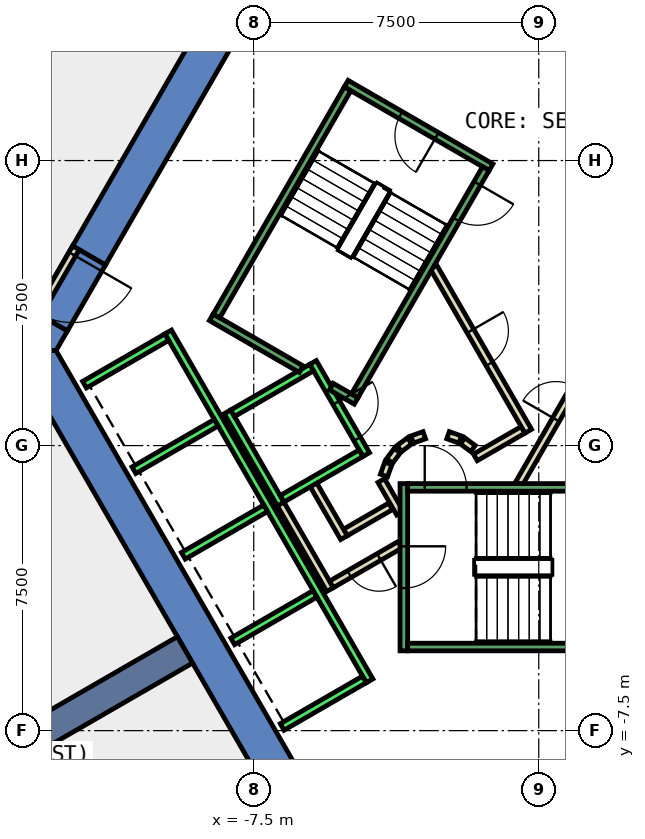
"""IFC4 building model, lengths in metres.
Left out: names, types, materials, properties, quantities, classifications, styles, units other than length and angle.
Written with IfcOpenShell. Run it as: python <this file> out.ifc"""

import sys

from ifc_helpers import new_model, si_unit, direction, frame, frame_2d, origin, place, context, subcontext, project, spatial, polyline, rectangle, outline, extrude, element, fill, save


model = new_model("IFC4")
c1 = context("Model", 3, precision=1e-05, world=origin(), true_north=direction((0.0, 1.0)))
c2 = subcontext(c1, "Body", "Model", "MODEL_VIEW")
j1 = project(units=[si_unit("LENGTHUNIT", "METRE"), si_unit("PLANEANGLEUNIT", "RADIAN")], contexts=[c1])
p1 = place(None, origin())
s1 = spatial("IfcSite", under=j1, at=p1, CompositionType="ELEMENT")
p2 = place(p1, origin())
s2 = spatial("IfcBuilding", under=s1, at=p2, CompositionType="ELEMENT")
p3 = place(p2, frame((0.0, 0.0, 30.0)))
s3 = spatial("IfcBuildingStorey", under=s2, at=p3, CompositionType="ELEMENT", Elevation=30.0)
p4 = place(p3, frame((0.0, 0.0, -0.45)))
e1 = element("IfcWall", 1, at=p4, inside=s3, PredefinedType="SHEAR", context=c2, shape_type="SweptSolid", body=[
    extrude(outline(polyline([(-12.267, 5.252), (-11.402, 4.752), (-6.351, 13.5), (-6.928, 14.5), (-12.267, 5.252)])), origin(), (0.0, 0.0, 1.0), 4.85),
])
p5 = place(p3, frame((0.0, 0.0, -0.45)))
e2 = element("IfcWall", 2, at=p5, inside=s3, PredefinedType="SHEAR", context=c2, shape_type="SweptSolid", body=[
    extrude(outline(polyline([(-12.402, 3.02), (-13.267, 3.52), (-13.856, 2.5), (-12.702, 2.5), (-12.402, 3.02)])), origin(), (0.0, 0.0, 1.0), 4.85),
])
p6 = place(p3, frame((0.0, 0.0, 3.6)))
e3 = element("IfcWall", 3, at=p6, inside=s3, PredefinedType="SHEAR", context=c2, shape_type="SweptSolid", body=[
    extrude(outline(polyline([(-13.267, 3.52), (-12.402, 3.02), (-11.402, 4.752), (-12.267, 5.252), (-13.267, 3.52)])), origin(), (0.0, 0.0, 1.0), 0.8),
])
p7 = place(p3, frame((0.0, 0.0, -0.45)))
e4 = element("IfcWall", 4, at=p7, inside=s3, PredefinedType="SHEAR", context=c2, shape_type="SweptSolid", body=[
    extrude(outline(polyline([(-13.856, 2.5), (-6.928, -9.5), (-6.351, -8.5), (-12.702, 2.5), (-13.856, 2.5)])), origin(), (0.0, 0.0, 1.0), 4.85),
])
p8 = place(p3, frame((-9.31, -5.375, -0.45), z_axis=(0.0, 0.0, 1.0), x_axis=(-0.866017533419, -0.500013631625, 0.0)))
e5 = element("IfcWall", 5, at=p8, inside=s3, PredefinedType="SHEAR", context=c2, shape_type="SweptSolid", body=[
    extrude(rectangle(XDim=9.0, YDim=0.8, at=frame_2d((4.5, 0.0))), origin(), (0.0, 0.0, 1.0), 4.85),
])
p9 = place(p3, frame((-3.9, -1.599, 0.0), z_axis=(0.0, 0.0, 1.0), x_axis=(-0.865969445389, -0.500096910261, 0.0)))
e6 = element("IfcWall", 6, at=p9, inside=s3, PredefinedType="PARTITIONING", context=c2, shape_type="SweptSolid", body=[
    extrude(rectangle(XDim=1.373, YDim=0.2, at=frame_2d((0.687, 0.0))), origin(), (0.0, 0.0, 1.0), 4.4),
])
p10 = place(p3, frame((-5.126, -2.422, 0.0), z_axis=(0.0, 0.0, 1.0), x_axis=(-0.500062241894, 0.865989465428, 0.0)))
e7 = element("IfcWall", 7, at=p10, inside=s3, PredefinedType="PARTITIONING", context=c2, shape_type="SweptSolid", body=[
    extrude(rectangle(XDim=1.7, YDim=0.2, at=frame_2d((0.85, 0.0))), origin(), (0.0, 0.0, 1.0), 4.4),
])
p11 = place(p3, frame((-5.492, -3.788, 0.0), z_axis=(0.0, 0.0, 1.0), x_axis=(-0.500008949224, 0.866020236886, 0.0)))
e8 = element("IfcWall", 8, at=p11, inside=s3, PredefinedType="PARTITIONING", context=c2, shape_type="SweptSolid", body=[
    extrude(rectangle(XDim=2.68, YDim=0.2, at=frame_2d((1.34, 0.0))), origin(), (0.0, 0.0, 1.0), 4.4),
])
p12 = place(p3, frame((-4.145, -0.92, 0.0), z_axis=(0.0, 0.0, 1.0), x_axis=(0.499743786207, -0.866173278362, 0.0)))
e9 = element("IfcWall", 9, at=p12, inside=s3, PredefinedType="PARTITIONING", context=c2, shape_type="SweptSolid", body=[
    extrude(rectangle(XDim=0.991, YDim=0.2, at=frame_2d((0.495, 0.0))), origin(), (0.0, 0.0, 1.0), 4.4),
])
p13 = place(p3, frame((-3.65, -2.61, 0.0), z_axis=(0.0, 0.0, 1.0), x_axis=(-0.866072462134, -0.499918483688, 0.0)))
e10 = element("IfcWall", 10, at=p13, inside=s3, PredefinedType="PARTITIONING", context=c2, shape_type="SweptSolid", body=[
    extrude(rectangle(XDim=2.084, YDim=0.2, at=frame_2d((1.042, 0.0))), origin(), (0.0, 0.0, 1.0), 4.4),
])
p14 = place(p13, frame((0.642, 0.0, 0.0)))
e11 = element("IfcOpeningElement", 11, at=p14, cuts=e10, PredefinedType="OPENING", context=c2, shape_type="SweptSolid", body=[
    extrude(rectangle(XDim=0.9, YDim=2.1, at=frame_2d((0.45, 1.05))), frame((0.0, 0.11, 0.0), z_axis=(0.0, -1.0, 0.0), x_axis=(1.0, 0.0, 0.0)), (0.0, 0.0, 1.0), 0.22),
])
p15 = place(p3, frame((-0.52, -1.0, 0.0), z_axis=(0.0, 0.0, 1.0), x_axis=(0.50011622646, 0.865958290007, 0.0)))
e12 = element("IfcWall", 12, at=p15, inside=s3, PredefinedType="PARTITIONING", context=c2, shape_type="SweptSolid", body=[
    extrude(rectangle(XDim=4.991, YDim=0.2, at=frame_2d((2.496, 0.0))), origin(), (0.0, 0.0, 1.0), 4.4),
])
p16 = place(p15, frame((1.945, 0.0, 0.0)))
e13 = element("IfcOpeningElement", 13, at=p16, cuts=e12, PredefinedType="OPENING", context=c2, shape_type="SweptSolid", body=[
    extrude(rectangle(XDim=1.0, YDim=2.1, at=frame_2d((0.5, 1.05))), frame((0.0, 0.11, 0.0), z_axis=(0.0, -1.0, 0.0), x_axis=(1.0, 0.0, 0.0)), (0.0, 0.0, 1.0), 0.22),
])
p17 = place(p3, frame((-0.412, 0.414, 0.0), z_axis=(0.0, 0.0, 1.0), x_axis=(-0.866017369001, -0.500013916395, 0.0)))
e14 = element("IfcWall", 14, at=p17, inside=s3, PredefinedType="PARTITIONING", context=c2, shape_type="SweptSolid", body=[
    extrude(rectangle(XDim=1.45, YDim=0.2, at=frame_2d((0.725, 0.0))), origin(), (0.0, 0.0, 1.0), 4.4),
])
p18 = place(p3, frame((-1.731, -0.077, 0.0), z_axis=(0.0, 0.0, 1.0), x_axis=(-0.804311165252, 0.594208338422, 0.0)))
e15 = element("IfcWall", 15, at=p18, inside=s3, PredefinedType="PARTITIONING", context=c2, shape_type="SweptSolid", body=[
    extrude(rectangle(XDim=0.338, YDim=0.2, at=frame_2d((0.169, 0.0))), origin(), (0.0, 0.0, 1.0), 4.4),
])
p19 = place(p3, frame((-2.07, 0.16, 0.0), z_axis=(0.0, 0.0, 1.0), x_axis=(-0.942199461132, 0.335052496547, 0.0)))
e16 = element("IfcWall", 16, at=p19, inside=s3, PredefinedType="PARTITIONING", context=c2, shape_type="SweptSolid", body=[
    extrude(rectangle(XDim=0.337, YDim=0.2, at=frame_2d((0.169, 0.0))), origin(), (0.0, 0.0, 1.0), 4.4),
])
p20 = place(p3, frame((-3.012, 0.273, 0.0), z_axis=(0.0, 0.0, 1.0), x_axis=(-0.942280615813, -0.334824194261, 0.0)))
e17 = element("IfcWall", 17, at=p20, inside=s3, PredefinedType="PARTITIONING", context=c2, shape_type="SweptSolid", body=[
    extrude(rectangle(XDim=0.338, YDim=0.2, at=frame_2d((0.169, 0.0))), origin(), (0.0, 0.0, 1.0), 4.4),
])
p21 = place(p3, frame((-3.397, 0.124, 0.0), z_axis=(0.0, 0.0, 1.0), x_axis=(-0.804311165252, -0.594208338422, 0.0)))
e18 = element("IfcWall", 18, at=p21, inside=s3, PredefinedType="PARTITIONING", context=c2, shape_type="SweptSolid", body=[
    extrude(rectangle(XDim=0.338, YDim=0.2, at=frame_2d((0.169, 0.0))), origin(), (0.0, 0.0, 1.0), 4.4),
])
p22 = place(p3, frame((-3.723, -0.131, 0.0), z_axis=(0.0, 0.0, 1.0), x_axis=(-0.594675113454, -0.803966112121, 0.0)))
e19 = element("IfcWall", 19, at=p22, inside=s3, PredefinedType="PARTITIONING", context=c2, shape_type="SweptSolid", body=[
    extrude(rectangle(XDim=0.338, YDim=0.2, at=frame_2d((0.169, 0.0))), origin(), (0.0, 0.0, 1.0), 4.4),
])
p23 = place(p3, frame((-3.96, -0.47, 0.0), z_axis=(0.0, 0.0, 1.0), x_axis=(-0.334824194261, -0.942280615813, 0.0)))
e20 = element("IfcWall", 20, at=p23, inside=s3, PredefinedType="PARTITIONING", context=c2, shape_type="SweptSolid", body=[
    extrude(rectangle(XDim=0.338, YDim=0.2, at=frame_2d((0.169, 0.0))), origin(), (0.0, 0.0, 1.0), 4.4),
])
p24 = place(p3, frame((-2.771, 4.7, 0.0), z_axis=(0.0, 0.0, 1.0), x_axis=(0.499969479948, -0.866043023828, 0.0)))
e21 = element("IfcWall", 21, at=p24, inside=s3, PredefinedType="PARTITIONING", context=c2, shape_type="SweptSolid", body=[
    extrude(rectangle(XDim=4.99, YDim=0.2, at=frame_2d((2.495, 0.0))), origin(), (0.0, 0.0, 1.0), 4.4),
])
p25 = place(p24, frame((1.945, 0.0, 0.0)))
e22 = element("IfcOpeningElement", 22, at=p25, cuts=e21, PredefinedType="OPENING", context=c2, shape_type="SweptSolid", body=[
    extrude(rectangle(XDim=1.0, YDim=2.1, at=frame_2d((0.5, 1.05))), frame((0.0, 0.11, 0.0), z_axis=(0.0, -1.0, 0.0), x_axis=(1.0, 0.0, 0.0)), (0.0, 0.0, 1.0), 0.22),
])
p26 = place(p3, frame((-12.18, 5.202, 0.0), z_axis=(0.0, 0.0, 1.0), x_axis=(-0.50002537861, -0.866010750942, 0.0)))
e23 = element("IfcWall", 23, at=p26, inside=s3, PredefinedType="PARTITIONING", context=c2, shape_type="SweptSolid", body=[
    extrude(rectangle(XDim=2.0, YDim=0.2, at=frame_2d((1.0, 0.0))), origin(), (0.0, 0.0, 1.0), 2.4),
])
p27 = place(p26, frame((0.19, 0.0, 0.0)))
e24 = element("IfcOpeningElement", 24, at=p27, cuts=e23, PredefinedType="OPENING", context=c2, shape_type="SweptSolid", body=[
    extrude(rectangle(XDim=1.8, YDim=2.1, at=frame_2d((0.9, 1.05))), frame((0.0, 0.11, 0.0), z_axis=(0.0, -1.0, 0.0), x_axis=(1.0, 0.0, 0.0)), (0.0, 0.0, 1.0), 0.22),
])
p28 = place(p3, frame((-5.94, 2.188, 0.0), z_axis=(0.0, 0.0, 1.0), x_axis=(0.49994636267, -0.866056369097, 0.0)))
e25 = element("IfcWall", 25, at=p28, inside=s3, PredefinedType="STANDARD", context=c2, shape_type="SweptSolid", body=[
    extrude(rectangle(XDim=2.8, YDim=0.2, at=frame_2d((1.4, 0.0))), origin(), (0.0, 0.0, 1.0), 4.4),
])
p29 = place(p28, frame((1.225, 0.0, 0.0)))
e26 = element("IfcOpeningElement", 26, at=p29, cuts=e25, PredefinedType="OPENING", context=c2, shape_type="SweptSolid", body=[
    extrude(rectangle(XDim=1.1, YDim=2.1, at=frame_2d((0.55, 1.05))), frame((0.0, 0.11, 0.0), z_axis=(0.0, -1.0, 0.0), x_axis=(1.0, 0.0, 0.0)), (0.0, 0.0, 1.0), 0.22),
])
p30 = place(p3, frame((-8.192, 0.888, 0.0), z_axis=(0.0, 0.0, 1.0), x_axis=(0.49994636267, -0.866056369097, 0.0)))
e27 = element("IfcWall", 27, at=p30, inside=s3, PredefinedType="STANDARD", context=c2, shape_type="SweptSolid", body=[
    extrude(rectangle(XDim=2.8, YDim=0.2, at=frame_2d((1.4, 0.0))), origin(), (0.0, 0.0, 1.0), 4.4),
])
for number, where, z_axis, x_axis in (
    (28, (-5.977, 2.052, 0.0), (0.0, 0.0, 1.0), (-0.866, -0.5, 0.0)),
    (29, (-4.677, -0.2, 0.0), (0.0, 0.0, 1.0), (-0.866, -0.5, 0.0)),
):
    element("IfcWall", number, at=place(p3, frame(where, z_axis=z_axis, x_axis=x_axis)), inside=s3, PredefinedType="STANDARD", context=c2, shape_type="SweptSolid", body=[
        extrude(rectangle(XDim=2.399, YDim=0.2, at=frame_2d((1.2, 0.0))), origin(), (0.0, 0.0, 1.0), 4.4),
    ])
p31 = place(p3, frame((-9.751, 2.99, 0.0), z_axis=(0.0, 0.0, 1.0), x_axis=(0.50000090737, -0.866024879913, 0.0)))
e30 = element("IfcWall", 30, at=p31, inside=s3, PredefinedType="STANDARD", context=c2, shape_type="SweptSolid", body=[
    extrude(rectangle(XDim=10.6, YDim=0.2, at=frame_2d((5.3, 0.0))), origin(), (0.0, 0.0, 1.0), 4.4),
])
p32 = place(p3, frame((-9.788, 2.853, 0.0), z_axis=(0.0, 0.0, 1.0), x_axis=(-0.865998541277, -0.500046524342, 0.0)))
e31 = element("IfcWall", 31, at=p32, inside=s3, PredefinedType="STANDARD", context=c2, shape_type="SweptSolid", body=[
    extrude(rectangle(XDim=2.5, YDim=0.2, at=frame_2d((1.25, 0.0))), origin(), (0.0, 0.0, 1.0), 4.4),
])
for number, where, z_axis, x_axis in (
    (32, (-8.488, 0.602, 0.0), (0.0, 0.0, 1.0), (-0.866, -0.5, 0.0)),
    (33, (-7.188, -1.65, 0.0), (0.0, 0.0, 1.0), (-0.866, -0.5, 0.0)),
    (34, (-5.888, -3.902, 0.0), (0.0, 0.0, 1.0), (-0.866, -0.5, 0.0)),
    (35, (-4.588, -6.153, 0.0), (0.0, 0.0, 1.0), (-0.866, -0.5, 0.0)),
):
    element("IfcWall", number, at=place(p3, frame(where, z_axis=z_axis, x_axis=x_axis)), inside=s3, PredefinedType="STANDARD", context=c2, shape_type="SweptSolid", body=[
        extrude(rectangle(XDim=2.5, YDim=0.2, at=frame_2d((1.25, 0.0))), origin(), (0.0, 0.0, 1.0), 4.4),
    ])
p33 = place(p3, frame((-3.55, -1.0, 0.0), z_axis=(0.0, 0.0, 1.0), x_axis=(0.0, -1.0, 0.0)))
e36 = element("IfcWall", 36, at=p33, inside=s3, PredefinedType="STANDARD", context=c2, shape_type="SweptSolid", body=[
    extrude(rectangle(XDim=4.4, YDim=0.2, at=frame_2d((2.2, 0.0))), origin(), (0.0, 0.0, 1.0), 4.4),
])
p34 = place(p33, frame((1.65, 0.0, 0.0)))
e37 = element("IfcOpeningElement", 37, at=p34, cuts=e36, PredefinedType="OPENING", context=c2, shape_type="SweptSolid", body=[
    extrude(rectangle(XDim=1.1, YDim=2.2, at=frame_2d((0.55, 1.1))), frame((0.0, 0.11, 0.0), z_axis=(0.0, -1.0, 0.0), x_axis=(1.0, 0.0, 0.0)), (0.0, 0.0, 1.0), 0.22),
])
p35 = place(p3, frame((-3.45, -1.1, 0.0), z_axis=(0.0, 0.0, 1.0), x_axis=(1.0, 0.0, 0.0)))
e38 = element("IfcWall", 38, at=p35, inside=s3, PredefinedType="STANDARD", context=c2, shape_type="SweptSolid", body=[
    extrude(rectangle(XDim=6.9, YDim=0.2, at=frame_2d((3.45, 0.0))), origin(), (0.0, 0.0, 1.0), 4.4),
])
p36 = place(p35, frame((0.45, 0.0, 0.0)))
e39 = element("IfcOpeningElement", 39, at=p36, cuts=e38, PredefinedType="OPENING", context=c2, shape_type="SweptSolid", body=[
    extrude(rectangle(XDim=1.1, YDim=2.2, at=frame_2d((0.55, 1.1))), frame((0.0, 0.11, 0.0), z_axis=(0.0, -1.0, 0.0), x_axis=(1.0, 0.0, 0.0)), (0.0, 0.0, 1.0), 0.22),
])
p37 = place(p3, frame((-3.45, -5.3, 0.0), z_axis=(0.0, 0.0, 1.0), x_axis=(1.0, 0.0, 0.0)))
e40 = element("IfcWall", 40, at=p37, inside=s3, PredefinedType="STANDARD", context=c2, shape_type="SweptSolid", body=[
    extrude(rectangle(XDim=6.9, YDim=0.2, at=frame_2d((3.45, 0.0))), origin(), (0.0, 0.0, 1.0), 4.4),
])
p38 = place(p3, frame((-1.256, 7.324, 0.0), z_axis=(0.0, 0.0, 1.0), x_axis=(-0.866046073146, 0.499964197906, 0.0)))
e41 = element("IfcWall", 41, at=p38, inside=s3, PredefinedType="STANDARD", context=c2, shape_type="SweptSolid", body=[
    extrude(rectangle(XDim=4.4, YDim=0.2, at=frame_2d((2.2, 0.0))), origin(), (0.0, 0.0, 1.0), 4.4),
])
p39 = place(p38, frame((1.65, 0.0, 0.0)))
e42 = element("IfcOpeningElement", 42, at=p39, cuts=e41, PredefinedType="OPENING", context=c2, shape_type="SweptSolid", body=[
    extrude(rectangle(XDim=1.1, YDim=2.2, at=frame_2d((0.55, 1.1))), frame((0.0, 0.11, 0.0), z_axis=(0.0, -1.0, 0.0), x_axis=(1.0, 0.0, 0.0)), (0.0, 0.0, 1.0), 0.22),
])
p40 = place(p3, frame((-6.25, 2.01, 0.0), z_axis=(0.0, 0.0, 1.0), x_axis=(-0.86611865017, 0.499838457731, 0.0)))
e43 = element("IfcWall", 43, at=p40, inside=s3, PredefinedType="STANDARD", context=c2, shape_type="SweptSolid", body=[
    extrude(rectangle(XDim=2.733, YDim=0.2, at=frame_2d((1.366, 0.0))), origin(), (0.0, 0.0, 1.0), 4.4),
])
p41 = place(p3, frame((-4.806, 1.176, 0.0), z_axis=(0.0, 0.0, 1.0), x_axis=(-0.866558586415, 0.499075361355, 0.0)))
e44 = element("IfcWall", 44, at=p41, inside=s3, PredefinedType="STANDARD", context=c2, shape_type="SweptSolid", body=[
    extrude(rectangle(XDim=0.751, YDim=0.2, at=frame_2d((0.376, 0.0))), origin(), (0.0, 0.0, 1.0), 4.4),
])
p42 = place(p3, frame((-1.393, 7.288, 0.0), z_axis=(0.0, 0.0, 1.0), x_axis=(-0.499963383562, -0.866046543262, 0.0)))
e45 = element("IfcWall", 45, at=p42, inside=s3, PredefinedType="STANDARD", context=c2, shape_type="SweptSolid", body=[
    extrude(rectangle(XDim=6.9, YDim=0.2, at=frame_2d((3.45, 0.0))), origin(), (0.0, 0.0, 1.0), 4.4),
])
p43 = place(p42, frame((0.45, 0.0, 0.0)))
e46 = element("IfcOpeningElement", 46, at=p43, cuts=e45, PredefinedType="OPENING", context=c2, shape_type="SweptSolid", body=[
    extrude(rectangle(XDim=1.1, YDim=2.2, at=frame_2d((0.55, 1.1))), frame((0.0, 0.11, 0.0), z_axis=(0.0, -1.0, 0.0), x_axis=(1.0, 0.0, 0.0)), (0.0, 0.0, 1.0), 0.22),
])
p44 = place(p3, frame((-5.03, 9.388, 0.0), z_axis=(0.0, 0.0, 1.0), x_axis=(-0.499978703459, -0.866037698999, 0.0)))
e47 = element("IfcWall", 47, at=p44, inside=s3, PredefinedType="STANDARD", context=c2, shape_type="SweptSolid", body=[
    extrude(rectangle(XDim=6.9, YDim=0.2, at=frame_2d((3.45, 0.0))), origin(), (0.0, 0.0, 1.0), 4.4),
])
p45 = place(p16, origin())
e48 = element("IfcDoor", 48, at=p45, inside=s3, OperationType="SINGLE_SWING_LEFT", PredefinedType="DOOR", context=c2, shape_type="SweptSolid", body=[
    extrude(rectangle(XDim=1.0, YDim=2.1, at=frame_2d((0.5, 1.05))), frame((0.0, 0.025, 0.0), z_axis=(0.0, -1.0, 0.0), x_axis=(1.0, 0.0, 0.0)), (0.0, 0.0, 1.0), 0.05),
])
fill(e13, e48)
p46 = place(p25, origin())
e49 = element("IfcDoor", 49, at=p46, inside=s3, OperationType="SINGLE_SWING_RIGHT", PredefinedType="DOOR", context=c2, shape_type="SweptSolid", body=[
    extrude(rectangle(XDim=1.0, YDim=2.1, at=frame_2d((0.5, 1.05))), frame((0.0, 0.025, 0.0), z_axis=(0.0, -1.0, 0.0), x_axis=(1.0, 0.0, 0.0)), (0.0, 0.0, 1.0), 0.05),
])
fill(e22, e49)
p47 = place(p14, origin())
e50 = element("IfcDoor", 50, at=p47, inside=s3, OperationType="SINGLE_SWING_LEFT", PredefinedType="DOOR", context=c2, shape_type="SweptSolid", body=[
    extrude(rectangle(XDim=0.9, YDim=2.1, at=frame_2d((0.45, 1.05))), frame((0.0, 0.025, 0.0), z_axis=(0.0, -1.0, 0.0), x_axis=(1.0, 0.0, 0.0)), (0.0, 0.0, 1.0), 0.05),
])
fill(e11, e50)
p48 = place(p27, origin())
e51 = element("IfcDoor", 51, at=p48, inside=s3, OperationType="DOUBLE_DOOR_SINGLE_SWING", PredefinedType="DOOR", context=c2, shape_type="SweptSolid", body=[
    extrude(rectangle(XDim=1.8, YDim=2.1, at=frame_2d((0.9, 1.05))), frame((0.0, 0.025, 0.0), z_axis=(0.0, -1.0, 0.0), x_axis=(1.0, 0.0, 0.0)), (0.0, 0.0, 1.0), 0.05),
])
fill(e24, e51)
p49 = place(p29, origin())
e52 = element("IfcDoor", 52, at=p49, inside=s3, OperationType="SLIDING_TO_LEFT", PredefinedType="DOOR", context=c2, shape_type="SweptSolid", body=[
    extrude(rectangle(XDim=1.1, YDim=2.1, at=frame_2d((0.55, 1.05))), frame((0.0, 0.025, 0.0), z_axis=(0.0, -1.0, 0.0), x_axis=(1.0, 0.0, 0.0)), (0.0, 0.0, 1.0), 0.05),
])
fill(e26, e52)
p50 = place(p36, origin())
e53 = element("IfcDoor", 53, at=p50, inside=s3, OperationType="SINGLE_SWING_LEFT", PredefinedType="DOOR", context=c2, shape_type="SweptSolid", body=[
    extrude(rectangle(XDim=1.1, YDim=2.2, at=frame_2d((0.55, 1.1))), frame((0.0, 0.025, 0.0), z_axis=(0.0, -1.0, 0.0), x_axis=(1.0, 0.0, 0.0)), (0.0, 0.0, 1.0), 0.05),
])
fill(e39, e53)
p51 = place(p34, origin())
e54 = element("IfcDoor", 54, at=p51, inside=s3, OperationType="SINGLE_SWING_LEFT", PredefinedType="DOOR", context=c2, shape_type="SweptSolid", body=[
    extrude(rectangle(XDim=1.1, YDim=2.2, at=frame_2d((0.55, 1.1))), frame((0.0, 0.025, 0.0), z_axis=(0.0, -1.0, 0.0), x_axis=(1.0, 0.0, 0.0)), (0.0, 0.0, 1.0), 0.05),
])
fill(e37, e54)
p52 = place(p43, origin())
e55 = element("IfcDoor", 55, at=p52, inside=s3, OperationType="SINGLE_SWING_LEFT", PredefinedType="DOOR", context=c2, shape_type="SweptSolid", body=[
    extrude(rectangle(XDim=1.1, YDim=2.2, at=frame_2d((0.55, 1.1))), frame((0.0, 0.025, 0.0), z_axis=(0.0, -1.0, 0.0), x_axis=(1.0, 0.0, 0.0)), (0.0, 0.0, 1.0), 0.05),
])
fill(e46, e55)
p53 = place(p39, origin())
e56 = element("IfcDoor", 56, at=p53, inside=s3, OperationType="SINGLE_SWING_LEFT", PredefinedType="DOOR", context=c2, shape_type="SweptSolid", body=[
    extrude(rectangle(XDim=1.1, YDim=2.2, at=frame_2d((0.55, 1.1))), frame((0.0, 0.025, 0.0), z_axis=(0.0, -1.0, 0.0), x_axis=(1.0, 0.0, 0.0)), (0.0, 0.0, 1.0), 0.05),
])
fill(e42, e56)
save(model, sys.argv[1])
